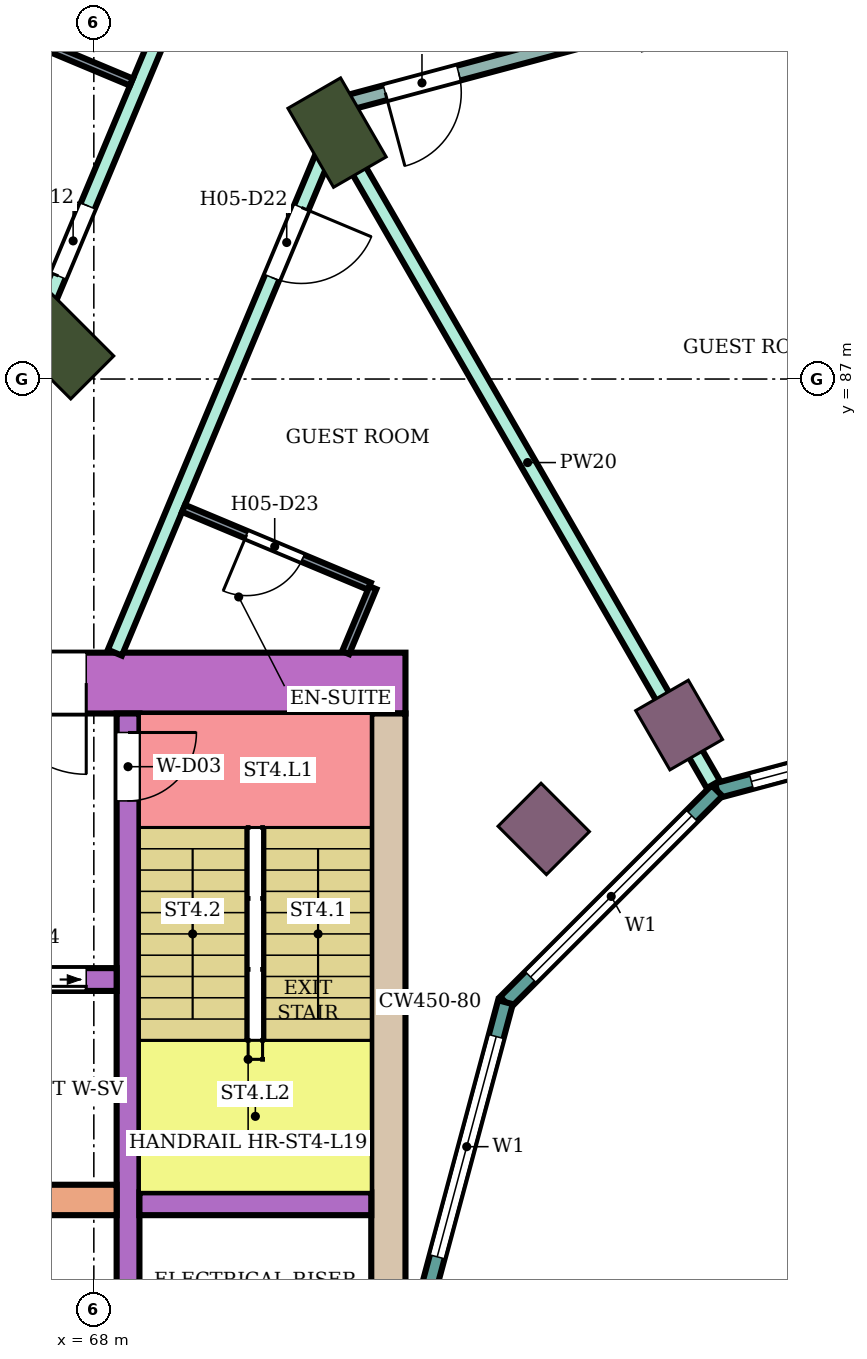
"""IFC4 building model, lengths in metres.
Left out: names, types, materials, properties, quantities, classifications, styles, units other than length and angle.
Written with IfcOpenShell. Run it as: python <this file> out.ifc"""

import sys

from ifc_helpers import new_model, si_unit, direction, frame, frame_2d, origin, origin_2d, place, context, subcontext, project, spatial, rectangle, extrude, element, fill, save


model = new_model("IFC4")
c1 = context("Model", 3, precision=1e-05, world=origin(), true_north=direction((0.0, 1.0)))
c2 = subcontext(c1, "Body", "Model", "MODEL_VIEW")
j1 = project(units=[si_unit("LENGTHUNIT", "METRE"), si_unit("PLANEANGLEUNIT", "RADIAN")], contexts=[c1])
p1 = place(None, origin())
s1 = spatial("IfcSite", under=j1, at=p1, CompositionType="ELEMENT")
p2 = place(p1, origin())
s2 = spatial("IfcBuilding", under=s1, at=p2, CompositionType="ELEMENT")
p3 = place(p2, frame((0.0, 0.0, 86.2)))
s3 = spatial("IfcBuildingStorey", under=s2, at=p3, CompositionType="ELEMENT", Elevation=86.2)
for number, where, z_axis, x_axis in (
    (1, (71.2, 90.242, 0.0), (0.0, 0.0, 1.0), (-0.5, 0.866, 0.0)),
    (2, (67.555, 87.445, 0.0), (0.0, 0.0, 1.0), (-0.707, 0.707, 0.0)),
):
    element("IfcColumn", number, at=place(p3, frame(where, z_axis=z_axis, x_axis=x_axis)), inside=s3, PredefinedType="COLUMN", context=c2, shape_type="SweptSolid", body=[
        extrude(rectangle(XDim=1.2, YDim=0.8, at=origin_2d()), origin(), (0.0, 0.0, 1.0), 3.8),
    ])
for number, where, z_axis, x_axis in (
    (3, (75.7, 82.448, 0.0), (0.0, 0.0, 1.0), (-0.5, 0.866, 0.0)),
    (4, (73.919, 81.081, 0.0), (0.0, 0.0, 1.0), (-0.707, 0.707, 0.0)),
):
    element("IfcColumn", number, at=place(p3, frame(where, z_axis=z_axis, x_axis=x_axis)), inside=s3, PredefinedType="COLUMN", context=c2, shape_type="SweptSolid", body=[
        extrude(rectangle(XDim=0.9, YDim=0.8, at=origin_2d()), origin(), (0.0, 0.0, 1.0), 3.8),
    ])
p4 = place(p3, frame((72.1, 83.0, 0.0), z_axis=(0.0, 0.0, 1.0), x_axis=(-1.0, 0.0, 0.0)))
e5 = element("IfcWall", 5, at=p4, inside=s3, PredefinedType="SHEAR", context=c2, shape_type="SweptSolid", body=[
    extrude(rectangle(XDim=14.7, YDim=0.8, at=frame_2d((7.35, 0.0))), origin(), (0.0, 0.0, 1.0), 3.48),
])
p5 = place(p4, frame((4.2, 0.0, 0.0)))
e6 = element("IfcOpeningElement", 6, at=p5, cuts=e5, PredefinedType="OPENING", context=c2, shape_type="SweptSolid", body=[
    extrude(rectangle(XDim=2.4, YDim=2.4, at=frame_2d((1.2, 1.2))), frame((0.0, 0.41, 0.0), z_axis=(0.0, -1.0, 0.0), x_axis=(1.0, 0.0, 0.0)), (0.0, 0.0, 1.0), 0.82),
])
p6 = place(p3, frame((71.875, 82.6, 0.0), z_axis=(0.0, 0.0, 1.0), x_axis=(0.0, -1.0, 0.0)))
e7 = element("IfcWall", 7, at=p6, inside=s3, PredefinedType="SHEAR", context=c2, shape_type="SweptSolid", body=[
    extrude(rectangle(XDim=7.6, YDim=0.45, at=frame_2d((3.8, 0.0))), origin(), (0.0, 0.0, 1.0), 3.48),
])
p7 = place(p3, frame((68.45, 82.6, 0.0), z_axis=(0.0, 0.0, 1.0), x_axis=(0.0, -1.0, 0.0)))
e8 = element("IfcWall", 8, at=p7, inside=s3, PredefinedType="SHEAR", context=c2, shape_type="SweptSolid", body=[
    extrude(rectangle(XDim=7.6, YDim=0.3, at=frame_2d((3.8, 0.0))), origin(), (0.0, 0.0, 1.0), 3.48),
])
p8 = place(p7, frame((0.25, 0.0, 0.0)))
e9 = element("IfcOpeningElement", 9, at=p8, cuts=e8, PredefinedType="OPENING", context=c2, shape_type="SweptSolid", body=[
    extrude(rectangle(XDim=0.9, YDim=2.1, at=frame_2d((0.45, 1.05))), frame((0.0, 0.16, 0.0), z_axis=(0.0, -1.0, 0.0), x_axis=(1.0, 0.0, 0.0)), (0.0, 0.0, 1.0), 0.32),
])
p9 = place(p3, frame((71.65, 76.15, 0.0), z_axis=(0.0, 0.0, 1.0), x_axis=(-1.0, 0.0, 0.0)))
e10 = element("IfcWall", 10, at=p9, inside=s3, PredefinedType="SHEAR", context=c2, shape_type="SweptSolid", body=[
    extrude(rectangle(XDim=3.05, YDim=0.3, at=frame_2d((1.525, 0.0))), origin(), (0.0, 0.0, 1.0), 3.48),
])
p10 = place(p3, frame((68.3, 76.2, 0.0), z_axis=(0.0, 0.0, 1.0), x_axis=(-1.0, 0.0, 0.0)))
e11 = element("IfcWall", 11, at=p10, inside=s3, PredefinedType="SHEAR", context=c2, shape_type="SweptSolid", body=[
    extrude(rectangle(XDim=10.9, YDim=0.4, at=frame_2d((5.45, 0.0))), origin(), (0.0, 0.0, 1.0), 3.48),
])
p11 = place(p3, frame((68.3, 79.1, 0.0), z_axis=(0.0, 0.0, 1.0), x_axis=(-1.0, 0.0, 0.0)))
e12 = element("IfcWall", 12, at=p11, inside=s3, PredefinedType="SHEAR", context=c2, shape_type="SweptSolid", body=[
    extrude(rectangle(XDim=10.9, YDim=0.3, at=frame_2d((5.45, 0.0))), origin(), (0.0, 0.0, 1.0), 3.48),
])
p12 = place(p11, frame((0.4, 0.0, 0.0)))
e13 = element("IfcOpeningElement", 13, at=p12, cuts=e12, PredefinedType="OPENING", context=c2, shape_type="SweptSolid", body=[
    extrude(rectangle(XDim=1.4, YDim=2.1, at=frame_2d((0.7, 1.05))), frame((0.0, 0.16, 0.0), z_axis=(0.0, -1.0, 0.0), x_axis=(1.0, 0.0, 0.0)), (0.0, 0.0, 1.0), 0.32),
])
p13 = place(p11, frame((5.4, 0.0, 0.0)))
e14 = element("IfcOpeningElement", 14, at=p13, cuts=e12, PredefinedType="OPENING", context=c2, shape_type="SweptSolid", body=[
    extrude(rectangle(XDim=1.4, YDim=2.1, at=frame_2d((0.7, 1.05))), frame((0.0, 0.16, 0.0), z_axis=(0.0, -1.0, 0.0), x_axis=(1.0, 0.0, 0.0)), (0.0, 0.0, 1.0), 0.32),
])
p14 = place(p11, frame((8.1, 0.0, 0.0)))
e15 = element("IfcOpeningElement", 15, at=p14, cuts=e12, PredefinedType="OPENING", context=c2, shape_type="SweptSolid", body=[
    extrude(rectangle(XDim=1.0, YDim=2.1, at=frame_2d((0.5, 1.05))), frame((0.0, 0.16, 0.0), z_axis=(0.0, -1.0, 0.0), x_axis=(1.0, 0.0, 0.0)), (0.0, 0.0, 1.0), 0.32),
])
p15 = place(p3, frame((80.0, 82.604, 0.0), z_axis=(0.0, 0.0, 1.0), x_axis=(-0.965933654434, -0.258789828301, 0.0)))
e16 = element("IfcWall", 16, at=p15, inside=s3, PredefinedType="NOTDEFINED", context=c2, shape_type="SweptSolid", body=[
    extrude(rectangle(XDim=3.936, YDim=0.2, at=frame_2d((1.968, 0.0))), origin(), (0.0, 0.0, 1.0), 3.8),
])
p16 = place(p15, frame((0.468, 0.0, 0.9)))
e17 = element("IfcOpeningElement", 17, at=p16, cuts=e16, PredefinedType="OPENING", context=c2, shape_type="SweptSolid", body=[
    extrude(rectangle(XDim=3.0, YDim=2.3, at=frame_2d((1.5, 1.15))), frame((0.0, 0.11, 0.0), z_axis=(0.0, -1.0, 0.0), x_axis=(1.0, 0.0, 0.0)), (0.0, 0.0, 1.0), 0.22),
])
p17 = place(p3, frame((76.198, 81.585, 0.0), z_axis=(0.0, 0.0, 1.0), x_axis=(-0.707106781187, -0.707106781187, 0.0)))
e18 = element("IfcWall", 18, at=p17, inside=s3, PredefinedType="NOTDEFINED", context=c2, shape_type="SweptSolid", body=[
    extrude(rectangle(XDim=3.936, YDim=0.2, at=frame_2d((1.968, 0.0))), origin(), (0.0, 0.0, 1.0), 3.8),
])
p18 = place(p17, frame((0.468, 0.0, 0.9)))
e19 = element("IfcOpeningElement", 19, at=p18, cuts=e18, PredefinedType="OPENING", context=c2, shape_type="SweptSolid", body=[
    extrude(rectangle(XDim=3.0, YDim=2.3, at=frame_2d((1.5, 1.15))), frame((0.0, 0.11, 0.0), z_axis=(0.0, -1.0, 0.0), x_axis=(1.0, 0.0, 0.0)), (0.0, 0.0, 1.0), 0.22),
])
p19 = place(p3, frame((73.415, 78.802, 0.0), z_axis=(0.0, 0.0, 1.0), x_axis=(-0.258789828301, -0.965933654434, 0.0)))
e20 = element("IfcWall", 20, at=p19, inside=s3, PredefinedType="NOTDEFINED", context=c2, shape_type="SweptSolid", body=[
    extrude(rectangle(XDim=3.936, YDim=0.2, at=frame_2d((1.968, 0.0))), origin(), (0.0, 0.0, 1.0), 3.8),
])
p20 = place(p19, frame((0.468, 0.0, 0.9)))
e21 = element("IfcOpeningElement", 21, at=p20, cuts=e20, PredefinedType="OPENING", context=c2, shape_type="SweptSolid", body=[
    extrude(rectangle(XDim=3.0, YDim=2.3, at=frame_2d((1.5, 1.15))), frame((0.0, 0.11, 0.0), z_axis=(0.0, -1.0, 0.0), x_axis=(1.0, 0.0, 0.0)), (0.0, 0.0, 1.0), 0.22),
])
p21 = place(p3, frame((66.085, 84.9, 0.0), z_axis=(0.0, 0.0, 1.0), x_axis=(0.386676248006, 0.922215527536, 0.0)))
e22 = element("IfcWall", 22, at=p21, inside=s3, PredefinedType="PARTITIONING", context=c2, shape_type="SweptSolid", body=[
    extrude(rectangle(XDim=8.5, YDim=0.2, at=frame_2d((4.25, 0.0))), origin(), (0.0, 0.0, 1.0), 3.35),
])
p22 = place(p21, frame((3.748, 0.0, 0.0)))
e23 = element("IfcOpeningElement", 23, at=p22, cuts=e22, PredefinedType="OPENING", context=c2, shape_type="SweptSolid", body=[
    extrude(rectangle(XDim=1.0, YDim=2.1, at=frame_2d((0.5, 1.05))), frame((0.0, 0.11, 0.0), z_axis=(0.0, -1.0, 0.0), x_axis=(1.0, 0.0, 0.0)), (0.0, 0.0, 1.0), 0.22),
])
p23 = place(p3, frame((68.277, 83.4, 0.0), z_axis=(0.0, 0.0, 1.0), x_axis=(0.386454861164, 0.922308321703, 0.0)))
e24 = element("IfcWall", 24, at=p23, inside=s3, PredefinedType="PARTITIONING", context=c2, shape_type="SweptSolid", body=[
    extrude(rectangle(XDim=7.762, YDim=0.2, at=frame_2d((3.881, 0.0))), origin(), (0.0, 0.0, 1.0), 3.35),
])
p24 = place(p23, frame((5.351, 0.0, 0.0)))
e25 = element("IfcOpeningElement", 25, at=p24, cuts=e24, PredefinedType="OPENING", context=c2, shape_type="SweptSolid", body=[
    extrude(rectangle(XDim=1.0, YDim=2.1, at=frame_2d((0.5, 1.05))), frame((0.0, 0.11, 0.0), z_axis=(0.0, -1.0, 0.0), x_axis=(1.0, 0.0, 0.0)), (0.0, 0.0, 1.0), 0.22),
])
p25 = place(p3, frame((71.264, 90.135, 0.0), z_axis=(0.0, 0.0, 1.0), x_axis=(0.499791624077, -0.866145676259, 0.0)))
e26 = element("IfcWall", 26, at=p25, inside=s3, PredefinedType="PARTITIONING", context=c2, shape_type="SweptSolid", body=[
    extrude(rectangle(XDim=9.778, YDim=0.2, at=frame_2d((4.889, 0.0))), origin(), (0.0, 0.0, 1.0), 3.35),
])
p26 = place(p3, frame((71.303, 90.625, 0.0), z_axis=(0.0, 0.0, 1.0), x_axis=(0.965971868307, 0.258647152776, 0.0)))
e27 = element("IfcWall", 27, at=p26, inside=s3, PredefinedType="PARTITIONING", context=c2, shape_type="SweptSolid", body=[
    extrude(rectangle(XDim=8.874, YDim=0.2, at=frame_2d((4.437, 0.0))), origin(), (0.0, 0.0, 1.0), 2.98),
])
p27 = place(p26, frame((0.55, 0.0, 0.0)))
e28 = element("IfcOpeningElement", 28, at=p27, cuts=e27, PredefinedType="OPENING", context=c2, shape_type="SweptSolid", body=[
    extrude(rectangle(XDim=1.0, YDim=2.1, at=frame_2d((0.5, 1.05))), frame((0.0, 0.11, 0.0), z_axis=(0.0, -1.0, 0.0), x_axis=(1.0, 0.0, 0.0)), (0.0, 0.0, 1.0), 0.22),
])
p28 = place(p3, frame((66.003, 91.95, 0.0), z_axis=(0.0, 0.0, 1.0), x_axis=(0.922350337209, -0.386354572188, 0.0)))
e29 = element("IfcWall", 29, at=p28, inside=s3, PredefinedType="PARTITIONING", context=c2, shape_type="SweptSolid", body=[
    extrude(rectangle(XDim=2.7, YDim=0.1, at=frame_2d((1.35, 0.0))), origin(), (0.0, 0.0, 1.0), 3.35),
])
p29 = place(p3, frame((69.181, 85.298, 0.0), z_axis=(0.0, 0.0, 1.0), x_axis=(0.922377635784, -0.38628939541, 0.0)))
e30 = element("IfcWall", 30, at=p29, inside=s3, PredefinedType="PARTITIONING", context=c2, shape_type="SweptSolid", body=[
    extrude(rectangle(XDim=2.65, YDim=0.1, at=frame_2d((1.325, 0.0))), origin(), (0.0, 0.0, 1.0), 3.35),
])
p30 = place(p29, frame((0.9, 0.0, 0.0)))
e31 = element("IfcOpeningElement", 31, at=p30, cuts=e30, PredefinedType="OPENING", context=c2, shape_type="SweptSolid", body=[
    extrude(rectangle(XDim=0.8, YDim=2.1, at=frame_2d((0.4, 1.05))), frame((0.0, 0.06, 0.0), z_axis=(0.0, -1.0, 0.0), x_axis=(1.0, 0.0, 0.0)), (0.0, 0.0, 1.0), 0.12),
])
p31 = place(p3, frame((71.313, 83.4, 0.0), z_axis=(0.0, 0.0, 1.0), x_axis=(0.386148512695, 0.922436624459, 0.0)))
e32 = element("IfcWall", 32, at=p31, inside=s3, PredefinedType="PARTITIONING", context=c2, shape_type="SweptSolid", body=[
    extrude(rectangle(XDim=0.927, YDim=0.1, at=frame_2d((0.463, 0.0))), origin(), (0.0, 0.0, 1.0), 3.35),
])
p32 = place(p16, origin())
e33 = element("IfcWindow", 33, at=p32, inside=s3, PartitioningType="SINGLE_PANEL", PredefinedType="WINDOW", context=c2, shape_type="SweptSolid", body=[
    extrude(rectangle(XDim=3.0, YDim=2.3, at=frame_2d((1.5, 1.15))), frame((0.0, 0.03, 0.0), z_axis=(0.0, -1.0, 0.0), x_axis=(1.0, 0.0, 0.0)), (0.0, 0.0, 1.0), 0.06),
])
fill(e17, e33)
p33 = place(p18, origin())
e34 = element("IfcWindow", 34, at=p33, inside=s3, PartitioningType="SINGLE_PANEL", PredefinedType="WINDOW", context=c2, shape_type="SweptSolid", body=[
    extrude(rectangle(XDim=3.0, YDim=2.3, at=frame_2d((1.5, 1.15))), frame((0.0, 0.03, 0.0), z_axis=(0.0, -1.0, 0.0), x_axis=(1.0, 0.0, 0.0)), (0.0, 0.0, 1.0), 0.06),
])
fill(e19, e34)
p34 = place(p20, origin())
e35 = element("IfcWindow", 35, at=p34, inside=s3, PartitioningType="SINGLE_PANEL", PredefinedType="WINDOW", context=c2, shape_type="SweptSolid", body=[
    extrude(rectangle(XDim=3.0, YDim=2.3, at=frame_2d((1.5, 1.15))), frame((0.0, 0.03, 0.0), z_axis=(0.0, -1.0, 0.0), x_axis=(1.0, 0.0, 0.0)), (0.0, 0.0, 1.0), 0.06),
])
fill(e21, e35)
p35 = place(p22, origin())
e36 = element("IfcDoor", 36, at=p35, inside=s3, OperationType="SINGLE_SWING_LEFT", PredefinedType="DOOR", context=c2, shape_type="SweptSolid", body=[
    extrude(rectangle(XDim=1.0, YDim=2.1, at=frame_2d((0.5, 1.05))), frame((0.0, 0.025, 0.0), z_axis=(0.0, -1.0, 0.0), x_axis=(1.0, 0.0, 0.0)), (0.0, 0.0, 1.0), 0.05),
])
fill(e23, e36)
p36 = place(p27, frame((1.0, 0.0, 0.0), z_axis=(0.0, 0.0, 1.0), x_axis=(-1.0, 0.0, 0.0)))
e37 = element("IfcDoor", 37, at=p36, inside=s3, OperationType="SINGLE_SWING_RIGHT", PredefinedType="DOOR", context=c2, shape_type="SweptSolid", body=[
    extrude(rectangle(XDim=1.0, YDim=2.1, at=frame_2d((0.5, 1.05))), frame((0.0, 0.025, 0.0), z_axis=(0.0, -1.0, 0.0), x_axis=(1.0, 0.0, 0.0)), (0.0, 0.0, 1.0), 0.05),
])
fill(e28, e37)
p37 = place(p24, frame((1.0, 0.0, 0.0), z_axis=(0.0, 0.0, 1.0), x_axis=(-1.0, 0.0, 0.0)))
e38 = element("IfcDoor", 38, at=p37, inside=s3, OperationType="SINGLE_SWING_LEFT", PredefinedType="DOOR", context=c2, shape_type="SweptSolid", body=[
    extrude(rectangle(XDim=1.0, YDim=2.1, at=frame_2d((0.5, 1.05))), frame((0.0, 0.025, 0.0), z_axis=(0.0, -1.0, 0.0), x_axis=(1.0, 0.0, 0.0)), (0.0, 0.0, 1.0), 0.05),
])
fill(e25, e38)
p38 = place(p30, frame((0.8, 0.0, 0.0), z_axis=(0.0, 0.0, 1.0), x_axis=(-1.0, 0.0, 0.0)))
e39 = element("IfcDoor", 39, at=p38, inside=s3, OperationType="SINGLE_SWING_RIGHT", PredefinedType="DOOR", context=c2, shape_type="SweptSolid", body=[
    extrude(rectangle(XDim=0.8, YDim=2.1, at=frame_2d((0.4, 1.05))), frame((0.0, 0.025, 0.0), z_axis=(0.0, -1.0, 0.0), x_axis=(1.0, 0.0, 0.0)), (0.0, 0.0, 1.0), 0.05),
])
fill(e31, e39)
p39 = place(p8, origin())
e40 = element("IfcDoor", 40, at=p39, inside=s3, OperationType="SINGLE_SWING_LEFT", PredefinedType="DOOR", context=c2, shape_type="SweptSolid", body=[
    extrude(rectangle(XDim=0.9, YDim=2.1, at=frame_2d((0.45, 1.05))), frame((0.0, 0.025, 0.0), z_axis=(0.0, -1.0, 0.0), x_axis=(1.0, 0.0, 0.0)), (0.0, 0.0, 1.0), 0.05),
])
fill(e9, e40)
p40 = place(p12, origin())
e41 = element("IfcDoor", 41, at=p40, inside=s3, OperationType="DOUBLE_DOOR_SLIDING", PredefinedType="DOOR", context=c2, shape_type="SweptSolid", body=[
    extrude(rectangle(XDim=1.4, YDim=2.1, at=frame_2d((0.7, 1.05))), frame((0.0, 0.025, 0.0), z_axis=(0.0, -1.0, 0.0), x_axis=(1.0, 0.0, 0.0)), (0.0, 0.0, 1.0), 0.05),
])
fill(e13, e41)
p41 = place(p5, origin())
e42 = element("IfcDoor", 42, at=p41, inside=s3, OperationType="DOUBLE_DOOR_SINGLE_SWING", PredefinedType="DOOR", context=c2, shape_type="SweptSolid", body=[
    extrude(rectangle(XDim=2.4, YDim=2.4, at=frame_2d((1.2, 1.2))), frame((0.0, 0.025, 0.0), z_axis=(0.0, -1.0, 0.0), x_axis=(1.0, 0.0, 0.0)), (0.0, 0.0, 1.0), 0.05),
])
fill(e6, e42)
save(model, sys.argv[1])
